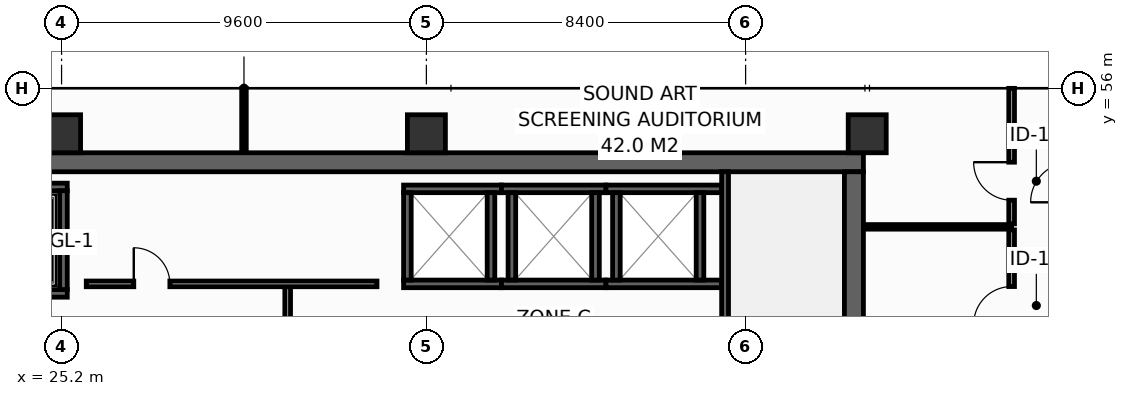
"""IFC4 building model, lengths in metres.
Left out: names, types, materials, properties, quantities, classifications, styles, units other than length and angle.
Written with IfcOpenShell. Run it as: python <this file> out.ifc"""

import sys

from ifc_helpers import new_model, si_unit, direction, frame, frame_2d, origin, origin_2d, place, context, subcontext, project, spatial, rectangle, hollow_rectangle, extrude, element, fill, save


model = new_model("IFC4")
c1 = context("Model", 3, precision=1e-05, world=origin(), true_north=direction((0.0, 1.0)))
c2 = subcontext(c1, "Body", "Model", "MODEL_VIEW")
j1 = project(units=[si_unit("LENGTHUNIT", "METRE"), si_unit("PLANEANGLEUNIT", "RADIAN")], contexts=[c1])
p1 = place(None, origin())
s1 = spatial("IfcSite", under=j1, at=p1, CompositionType="ELEMENT")
p2 = place(p1, origin())
s2 = spatial("IfcBuilding", under=s1, at=p2, CompositionType="ELEMENT")
p3 = place(p2, frame((0.0, 0.0, 141.0)))
s3 = spatial("IfcBuildingStorey", under=s2, at=p3, CompositionType="ELEMENT", Elevation=141.0)
p4 = place(p3, frame((13.6, 54.05, 0.0), z_axis=(0.0, 0.0, 1.0), x_axis=(1.0, 0.0, 0.0)))
e1 = element("IfcWall", 1, at=p4, inside=s3, PredefinedType="SHEAR", context=c2, shape_type="SweptSolid", body=[
    extrude(rectangle(XDim=32.7, YDim=0.5, at=frame_2d((16.35, 0.0))), origin(), (0.0, 0.0, 1.0), 3.55),
])
p5 = place(p3, frame((46.05, 43.4, 0.0), z_axis=(0.0, 0.0, 1.0), x_axis=(0.0, 1.0, 0.0)))
e2 = element("IfcWall", 2, at=p5, inside=s3, PredefinedType="SHEAR", context=c2, shape_type="SweptSolid", body=[
    extrude(rectangle(XDim=10.4, YDim=0.5, at=frame_2d((5.2, 0.0))), origin(), (0.0, 0.0, 1.0), 3.55),
])
for number, where, z_axis, x_axis in (
    (3, (25.2, 54.8, 0.0), (0.0, 0.0, 1.0), (1.0, 0.0, 0.0)),
    (4, (34.8, 54.8, 0.0), (0.0, 0.0, 1.0), (1.0, 0.0, 0.0)),
    (5, (46.4, 54.8, 0.0), (0.0, 0.0, 1.0), (1.0, 0.0, 0.0)),
):
    element("IfcColumn", number, at=place(p3, frame(where, z_axis=z_axis, x_axis=x_axis)), inside=s3, PredefinedType="COLUMN", context=c2, shape_type="SweptSolid", body=[
        extrude(hollow_rectangle(XDim=1.0, YDim=1.0, WallThickness=0.045, at=origin_2d()), origin(), (0.0, 0.0, 1.0), 3.8),
    ])
p6 = place(p3, frame((22.5, 50.6, 0.0), z_axis=(0.0, 0.0, 1.0), x_axis=(1.0, 0.0, 0.0)))
e6 = element("IfcWall", 6, at=p6, inside=s3, PredefinedType="SHEAR", context=c2, shape_type="SweptSolid", body=[
    extrude(rectangle(XDim=2.85, YDim=0.2, at=frame_2d((1.425, 0.0))), origin(), (0.0, 0.0, 1.0), 3.55),
])
p7 = place(p6, frame((0.925, 0.0, 0.0)))
e7 = element("IfcOpeningElement", 7, at=p7, cuts=e6, PredefinedType="OPENING", context=c2, shape_type="SweptSolid", body=[
    extrude(rectangle(XDim=1.25, YDim=2.3, at=frame_2d((0.625, 1.15))), frame((0.0, 0.11, 0.0), z_axis=(0.0, -1.0, 0.0), x_axis=(1.0, 0.0, 0.0)), (0.0, 0.0, 1.0), 0.22),
])
p8 = place(p3, frame((22.5, 53.4, 0.0), z_axis=(0.0, 0.0, 1.0), x_axis=(1.0, 0.0, 0.0)))
e8 = element("IfcWall", 8, at=p8, inside=s3, PredefinedType="SHEAR", context=c2, shape_type="SweptSolid", body=[
    extrude(rectangle(XDim=2.85, YDim=0.2, at=frame_2d((1.425, 0.0))), origin(), (0.0, 0.0, 1.0), 3.55),
])
p9 = place(p3, frame((25.25, 50.7, 0.0), z_axis=(0.0, 0.0, 1.0), x_axis=(0.0, 1.0, 0.0)))
e9 = element("IfcWall", 9, at=p9, inside=s3, PredefinedType="SHEAR", context=c2, shape_type="SweptSolid", body=[
    extrude(rectangle(XDim=2.6, YDim=0.2, at=frame_2d((1.3, 0.0))), origin(), (0.0, 0.0, 1.0), 3.55),
])
for number, where, z_axis, x_axis in (
    (10, (34.2, 50.85, 0.0), (0.0, 0.0, 1.0), (1.0, 0.0, 0.0)),
    (11, (34.2, 53.35, 0.0), (0.0, 0.0, 1.0), (1.0, 0.0, 0.0)),
):
    element("IfcWall", number, at=place(p3, frame(where, z_axis=z_axis, x_axis=x_axis)), inside=s3, PredefinedType="SHEAR", context=c2, shape_type="SweptSolid", body=[
        extrude(rectangle(XDim=2.575, YDim=0.2, at=frame_2d((1.288, 0.0))), origin(), (0.0, 0.0, 1.0), 3.55),
    ])
for number, where, z_axis, x_axis in (
    (12, (34.3, 50.95, 0.0), (0.0, 0.0, 1.0), (0.0, 1.0, 0.0)),
    (13, (36.5, 50.95, 0.0), (0.0, 0.0, 1.0), (0.0, 1.0, 0.0)),
):
    element("IfcWall", number, at=place(p3, frame(where, z_axis=z_axis, x_axis=x_axis)), inside=s3, PredefinedType="SHEAR", context=c2, shape_type="SweptSolid", body=[
        extrude(rectangle(XDim=2.3, YDim=0.2, at=frame_2d((1.15, 0.0))), origin(), (0.0, 0.0, 1.0), 3.55),
    ])
for number, where, z_axis, x_axis in (
    (14, (36.775, 50.85, 0.0), (0.0, 0.0, 1.0), (1.0, 0.0, 0.0)),
    (15, (36.775, 53.35, 0.0), (0.0, 0.0, 1.0), (1.0, 0.0, 0.0)),
):
    element("IfcWall", number, at=place(p3, frame(where, z_axis=z_axis, x_axis=x_axis)), inside=s3, PredefinedType="SHEAR", context=c2, shape_type="SweptSolid", body=[
        extrude(rectangle(XDim=2.75, YDim=0.2, at=frame_2d((1.375, 0.0))), origin(), (0.0, 0.0, 1.0), 3.55),
    ])
for number, where, z_axis, x_axis in (
    (16, (37.05, 50.95, 0.0), (0.0, 0.0, 1.0), (0.0, 1.0, 0.0)),
    (17, (39.25, 50.95, 0.0), (0.0, 0.0, 1.0), (0.0, 1.0, 0.0)),
):
    element("IfcWall", number, at=place(p3, frame(where, z_axis=z_axis, x_axis=x_axis)), inside=s3, PredefinedType="SHEAR", context=c2, shape_type="SweptSolid", body=[
        extrude(rectangle(XDim=2.3, YDim=0.2, at=frame_2d((1.15, 0.0))), origin(), (0.0, 0.0, 1.0), 3.55),
    ])
for number, where, z_axis, x_axis in (
    (18, (39.525, 50.85, 0.0), (0.0, 0.0, 1.0), (1.0, 0.0, 0.0)),
    (19, (39.525, 53.35, 0.0), (0.0, 0.0, 1.0), (1.0, 0.0, 0.0)),
):
    element("IfcWall", number, at=place(p3, frame(where, z_axis=z_axis, x_axis=x_axis)), inside=s3, PredefinedType="SHEAR", context=c2, shape_type="SweptSolid", body=[
        extrude(rectangle(XDim=3.045, YDim=0.2, at=frame_2d((1.522, 0.0))), origin(), (0.0, 0.0, 1.0), 3.55),
    ])
for number, where, z_axis, x_axis in (
    (20, (39.8, 50.95, 0.0), (0.0, 0.0, 1.0), (0.0, 1.0, 0.0)),
    (21, (42.0, 50.95, 0.0), (0.0, 0.0, 1.0), (0.0, 1.0, 0.0)),
):
    element("IfcWall", number, at=place(p3, frame(where, z_axis=z_axis, x_axis=x_axis)), inside=s3, PredefinedType="SHEAR", context=c2, shape_type="SweptSolid", body=[
        extrude(rectangle(XDim=2.3, YDim=0.2, at=frame_2d((1.15, 0.0))), origin(), (0.0, 0.0, 1.0), 3.55),
    ])
p10 = place(p3, frame((42.66, 53.8, 0.0), z_axis=(0.0, 0.0, 1.0), x_axis=(0.0, -1.0, 0.0)))
e22 = element("IfcWall", 22, at=p10, inside=s3, PredefinedType="SHEAR", context=c2, shape_type="SweptSolid", body=[
    extrude(rectangle(XDim=10.4, YDim=0.18, at=frame_2d((5.2, 0.0))), origin(), (0.0, 0.0, 1.0), 3.55),
])
p11 = place(p10, frame((8.99, 0.0, 0.0)))
e23 = element("IfcOpeningElement", 23, at=p11, cuts=e22, PredefinedType="OPENING", context=c2, shape_type="SweptSolid", body=[
    extrude(rectangle(XDim=1.1, YDim=2.15, at=frame_2d((0.55, 1.075))), frame((0.0, 0.1, 0.0), z_axis=(0.0, -1.0, 0.0), x_axis=(1.0, 0.0, 0.0)), (0.0, 0.0, 1.0), 0.2),
])
p12 = place(p3, frame((31.15, 46.5, 0.0), z_axis=(0.0, 0.0, 1.0), x_axis=(0.0, 1.0, 0.0)))
e24 = element("IfcWall", 24, at=p12, inside=s3, PredefinedType="PARTITIONING", context=c2, shape_type="SweptSolid", body=[
    extrude(rectangle(XDim=4.35, YDim=0.15, at=frame_2d((2.175, 0.0))), origin(), (0.0, 0.0, 1.0), 3.55),
])
p13 = place(p12, frame((1.5, 0.0, 0.0)))
e25 = element("IfcOpeningElement", 25, at=p13, cuts=e24, PredefinedType="OPENING", context=c2, shape_type="SweptSolid", body=[
    extrude(rectangle(XDim=1.05, YDim=2.15, at=frame_2d((0.525, 1.075))), frame((0.0, 0.085, 0.0), z_axis=(0.0, -1.0, 0.0), x_axis=(1.0, 0.0, 0.0)), (0.0, 0.0, 1.0), 0.17),
])
p14 = place(p3, frame((25.85, 50.85, 0.0), z_axis=(0.0, 0.0, 1.0), x_axis=(1.0, 0.0, 0.0)))
e26 = element("IfcWall", 26, at=p14, inside=s3, PredefinedType="PARTITIONING", context=c2, shape_type="SweptSolid", body=[
    extrude(rectangle(XDim=7.65, YDim=0.15, at=frame_2d((3.825, 0.0))), origin(), (0.0, 0.0, 1.0), 3.55),
])
p15 = place(p14, frame((1.25, 0.0, 0.0)))
e27 = element("IfcOpeningElement", 27, at=p15, cuts=e26, PredefinedType="OPENING", context=c2, shape_type="SweptSolid", body=[
    extrude(rectangle(XDim=0.95, YDim=2.15, at=frame_2d((0.475, 1.075))), frame((0.0, 0.085, 0.0), z_axis=(0.0, -1.0, 0.0), x_axis=(1.0, 0.0, 0.0)), (0.0, 0.0, 1.0), 0.17),
])
p16 = place(p3, frame((46.32, 52.35, 0.0), z_axis=(0.0, 0.0, 1.0), x_axis=(1.0, 0.0, 0.0)))
e28 = element("IfcWall", 28, at=p16, inside=s3, PredefinedType="PARTITIONING", context=c2, shape_type="SweptSolid", body=[
    extrude(rectangle(XDim=3.88, YDim=0.12, at=frame_2d((1.94, 0.0))), origin(), (0.0, 0.0, 1.0), 3.55),
])
p17 = place(p3, frame((30.0, 54.32, 0.0), z_axis=(0.0, 0.0, 1.0), x_axis=(0.0, 1.0, 0.0)))
e29 = element("IfcWall", 29, at=p17, inside=s3, PredefinedType="PARTITIONING", context=c2, shape_type="SweptSolid", body=[
    extrude(rectangle(XDim=1.675, YDim=0.12, at=frame_2d((0.837, 0.0))), origin(), (0.0, 0.0, 1.0), 2.935),
])
p18 = place(p3, frame((50.2, 48.29, 0.0), z_axis=(0.0, 0.0, 1.0), x_axis=(0.0, 1.0, 0.0)))
e30 = element("IfcWall", 30, at=p18, inside=s3, PredefinedType="PARTITIONING", context=c2, shape_type="SweptSolid", body=[
    extrude(rectangle(XDim=3.98, YDim=0.15, at=frame_2d((1.99, 0.0))), origin(), (0.0, 0.0, 1.0), 3.55),
])
p19 = place(p18, frame((1.49, 0.0, 0.0)))
e31 = element("IfcOpeningElement", 31, at=p19, cuts=e30, PredefinedType="OPENING", context=c2, shape_type="SweptSolid", body=[
    extrude(rectangle(XDim=1.0, YDim=2.15, at=frame_2d((0.5, 1.075))), frame((0.0, 0.085, 0.0), z_axis=(0.0, -1.0, 0.0), x_axis=(1.0, 0.0, 0.0)), (0.0, 0.0, 1.0), 0.17),
])
p20 = place(p3, frame((50.2, 52.43, 0.0), z_axis=(0.0, 0.0, 1.0), x_axis=(0.0, 1.0, 0.0)))
e32 = element("IfcWall", 32, at=p20, inside=s3, PredefinedType="PARTITIONING", context=c2, shape_type="SweptSolid", body=[
    extrude(rectangle(XDim=3.565, YDim=0.15, at=frame_2d((1.783, 0.0))), origin(), (0.0, 0.0, 1.0), 2.935),
])
p21 = place(p20, frame((0.622, 0.0, 0.0)))
e33 = element("IfcOpeningElement", 33, at=p21, cuts=e32, PredefinedType="OPENING", context=c2, shape_type="SweptSolid", body=[
    extrude(rectangle(XDim=1.0, YDim=2.15, at=frame_2d((0.5, 1.075))), frame((0.0, 0.085, 0.0), z_axis=(0.0, -1.0, 0.0), x_axis=(1.0, 0.0, 0.0)), (0.0, 0.0, 1.0), 0.17),
])
p22 = place(p15, origin())
e34 = element("IfcDoor", 34, at=p22, inside=s3, OperationType="SINGLE_SWING_LEFT", PredefinedType="DOOR", context=c2, shape_type="SweptSolid", body=[
    extrude(rectangle(XDim=0.95, YDim=2.15, at=frame_2d((0.475, 1.075))), frame((0.0, 0.025, 0.0), z_axis=(0.0, -1.0, 0.0), x_axis=(1.0, 0.0, 0.0)), (0.0, 0.0, 1.0), 0.05),
])
fill(e27, e34)
p23 = place(p19, origin())
e35 = element("IfcDoor", 35, at=p23, inside=s3, OperationType="SINGLE_SWING_LEFT", PredefinedType="DOOR", context=c2, shape_type="SweptSolid", body=[
    extrude(rectangle(XDim=1.0, YDim=2.15, at=frame_2d((0.5, 1.075))), frame((0.0, 0.025, 0.0), z_axis=(0.0, -1.0, 0.0), x_axis=(1.0, 0.0, 0.0)), (0.0, 0.0, 1.0), 0.05),
])
fill(e31, e35)
p24 = place(p21, origin())
e36 = element("IfcDoor", 36, at=p24, inside=s3, OperationType="SINGLE_SWING_RIGHT", PredefinedType="DOOR", context=c2, shape_type="SweptSolid", body=[
    extrude(rectangle(XDim=1.0, YDim=2.15, at=frame_2d((0.5, 1.075))), frame((0.0, 0.025, 0.0), z_axis=(0.0, -1.0, 0.0), x_axis=(1.0, 0.0, 0.0)), (0.0, 0.0, 1.0), 0.05),
])
fill(e33, e36)
save(model, sys.argv[1])
